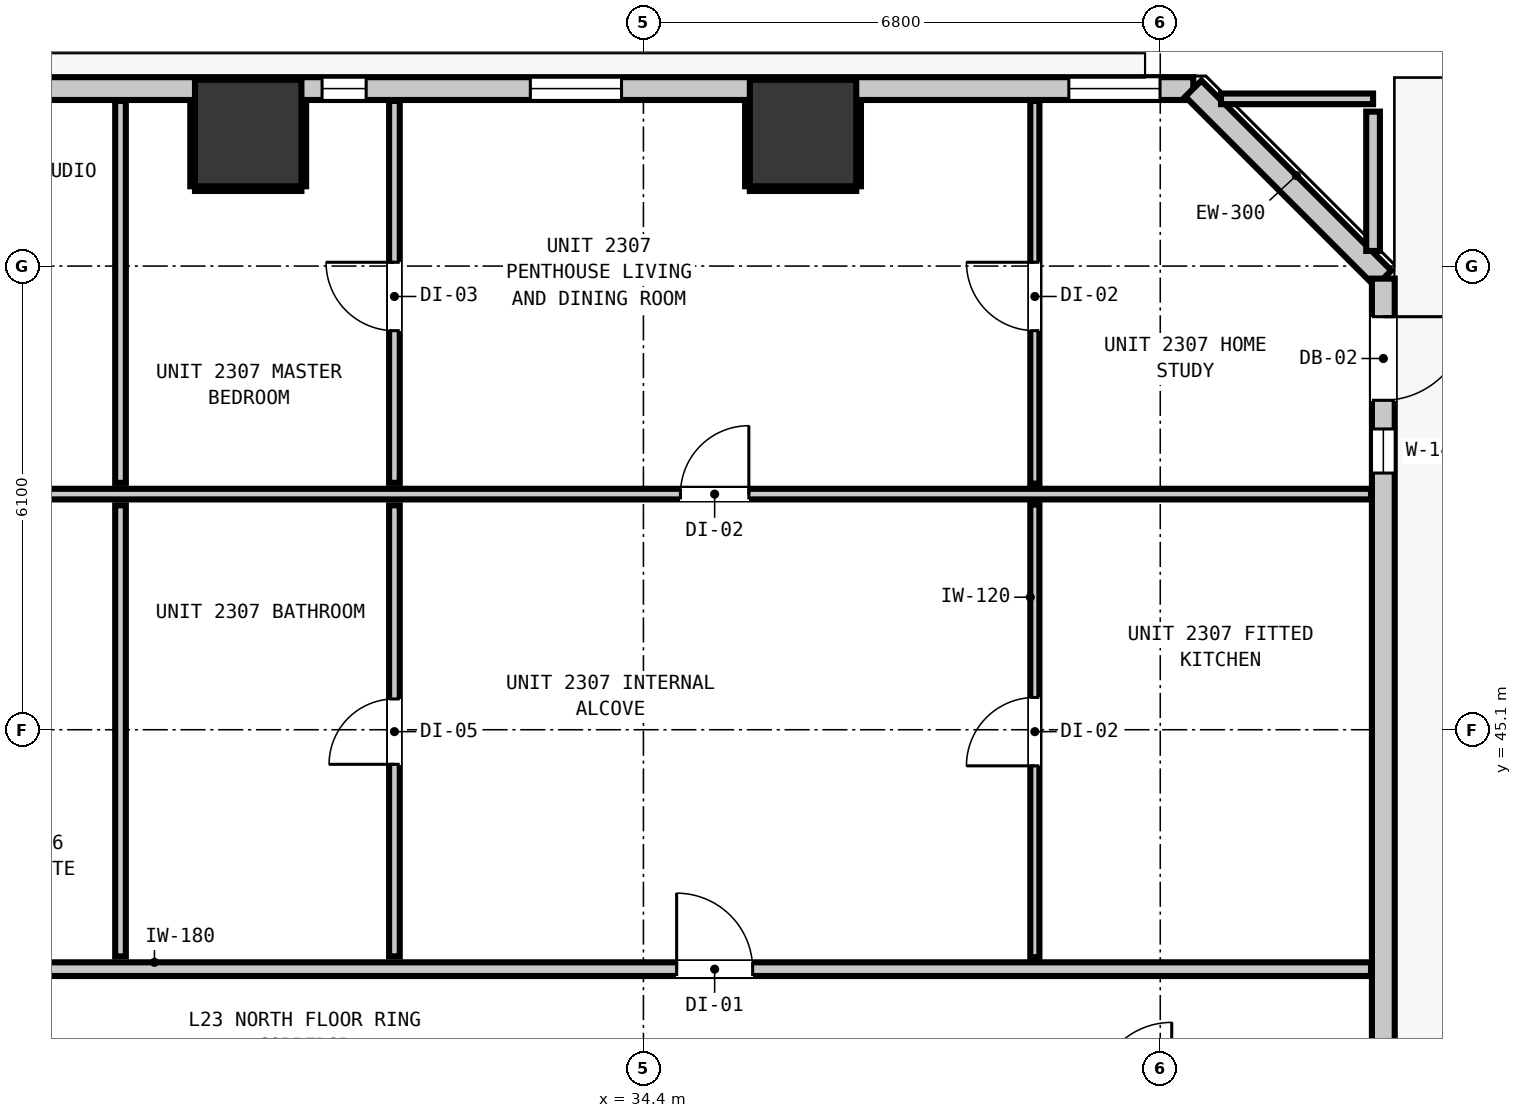
"""IFC4 building model, lengths in metres.
Left out: names, types, materials, properties, quantities, classifications, styles, units other than length and angle.
Written with IfcOpenShell. Run it as: python <this file> out.ifc"""

import sys

from ifc_helpers import new_model, si_unit, direction, frame, frame_2d, origin, origin_2d, place, context, subcontext, project, spatial, rectangle, extrude, element, fill, save


model = new_model("IFC4")
c1 = context("Model", 3, precision=1e-05, world=origin(), true_north=direction((0.0, 1.0)))
c2 = subcontext(c1, "Body", "Model", "MODEL_VIEW")
j1 = project(units=[si_unit("LENGTHUNIT", "METRE"), si_unit("PLANEANGLEUNIT", "RADIAN")], contexts=[c1])
p1 = place(None, origin())
s1 = spatial("IfcSite", under=j1, at=p1, CompositionType="ELEMENT")
p2 = place(p1, origin())
s2 = spatial("IfcBuilding", under=s1, at=p2, CompositionType="ELEMENT")
p3 = place(p2, frame((0.0, 0.0, 81.76)))
s3 = spatial("IfcBuildingStorey", under=s2, at=p3, CompositionType="ELEMENT", Elevation=81.76)
for number, where, z_axis, x_axis in (
    (1, (29.2, 52.95, -0.2), (0.0, 0.0, 1.0), (1.0, 0.0, 0.0)),
    (2, (36.5, 52.95, -0.2), (0.0, 0.0, 1.0), (1.0, 0.0, 0.0)),
):
    element("IfcColumn", number, at=place(p3, frame(where, z_axis=z_axis, x_axis=x_axis)), inside=s3, PredefinedType="COLUMN", context=c2, shape_type="SweptSolid", body=[
        extrude(rectangle(XDim=1.4, YDim=1.4, at=origin_2d()), origin(), (0.0, 0.0, 1.0), 3.52),
    ])
p4 = place(p3, frame((4.165, 53.535, 0.0), z_axis=(0.0, 0.0, 1.0), x_axis=(1.0, 0.0, 0.0)))
e3 = element("IfcWall", 3, at=p4, inside=s3, PredefinedType="STANDARD", context=c2, shape_type="SweptSolid", body=[
    extrude(rectangle(XDim=37.47, YDim=0.3, at=frame_2d((18.735, 0.0))), origin(), (0.0, 0.0, 1.0), 3.06),
])
p5 = place(p4, frame((1.951, 0.0, 0.0)))
e4 = element("IfcOpeningElement", 4, at=p5, cuts=e3, PredefinedType="OPENING", context=c2, shape_type="SweptSolid", body=[
    extrude(rectangle(XDim=1.0, YDim=2.15, at=frame_2d((0.5, 1.075))), frame((0.0, 0.16, 0.0), z_axis=(0.0, -1.0, 0.0), x_axis=(1.0, 0.0, 0.0)), (0.0, 0.0, 1.0), 0.32),
])
p6 = place(p4, frame((4.753, 0.0, 0.85)))
e5 = element("IfcOpeningElement", 5, at=p6, cuts=e3, PredefinedType="OPENING", context=c2, shape_type="SweptSolid", body=[
    extrude(rectangle(XDim=1.2, YDim=1.8, at=frame_2d((0.6, 0.9))), frame((0.0, 0.16, 0.0), z_axis=(0.0, -1.0, 0.0), x_axis=(1.0, 0.0, 0.0)), (0.0, 0.0, 1.0), 0.32),
])
p7 = place(p4, frame((0.324, 0.0, 0.85)))
e6 = element("IfcOpeningElement", 6, at=p7, cuts=e3, PredefinedType="OPENING", context=c2, shape_type="SweptSolid", body=[
    extrude(rectangle(XDim=0.58, YDim=1.5, at=frame_2d((0.29, 0.75))), frame((0.0, 0.16, 0.0), z_axis=(0.0, -1.0, 0.0), x_axis=(1.0, 0.0, 0.0)), (0.0, 0.0, 1.0), 0.32),
])
p8 = place(p4, frame((10.571, 0.0, 0.85)))
e7 = element("IfcOpeningElement", 7, at=p8, cuts=e3, PredefinedType="OPENING", context=c2, shape_type="SweptSolid", body=[
    extrude(rectangle(XDim=1.2, YDim=1.8, at=frame_2d((0.6, 0.9))), frame((0.0, 0.16, 0.0), z_axis=(0.0, -1.0, 0.0), x_axis=(1.0, 0.0, 0.0)), (0.0, 0.0, 1.0), 0.32),
])
p9 = place(p4, frame((13.671, 0.0, 0.85)))
e8 = element("IfcOpeningElement", 8, at=p9, cuts=e3, PredefinedType="OPENING", context=c2, shape_type="SweptSolid", body=[
    extrude(rectangle(XDim=1.2, YDim=1.8, at=frame_2d((0.6, 0.9))), frame((0.0, 0.16, 0.0), z_axis=(0.0, -1.0, 0.0), x_axis=(1.0, 0.0, 0.0)), (0.0, 0.0, 1.0), 0.32),
])
p10 = place(p4, frame((28.747, 0.0, 0.85)))
e9 = element("IfcOpeningElement", 9, at=p10, cuts=e3, PredefinedType="OPENING", context=c2, shape_type="SweptSolid", body=[
    extrude(rectangle(XDim=1.2, YDim=1.8, at=frame_2d((0.6, 0.9))), frame((0.0, 0.16, 0.0), z_axis=(0.0, -1.0, 0.0), x_axis=(1.0, 0.0, 0.0)), (0.0, 0.0, 1.0), 0.32),
])
p11 = place(p4, frame((26.007, 0.0, 0.85)))
e10 = element("IfcOpeningElement", 10, at=p11, cuts=e3, PredefinedType="OPENING", context=c2, shape_type="SweptSolid", body=[
    extrude(rectangle(XDim=0.58, YDim=1.5, at=frame_2d((0.29, 0.75))), frame((0.0, 0.16, 0.0), z_axis=(0.0, -1.0, 0.0), x_axis=(1.0, 0.0, 0.0)), (0.0, 0.0, 1.0), 0.32),
])
p12 = place(p4, frame((35.832, 0.0, 0.85)))
e11 = element("IfcOpeningElement", 11, at=p12, cuts=e3, PredefinedType="OPENING", context=c2, shape_type="SweptSolid", body=[
    extrude(rectangle(XDim=1.2, YDim=1.8, at=frame_2d((0.6, 0.9))), frame((0.0, 0.16, 0.0), z_axis=(0.0, -1.0, 0.0), x_axis=(1.0, 0.0, 0.0)), (0.0, 0.0, 1.0), 0.32),
])
p13 = place(p3, frame((41.635, 53.535, 0.0), z_axis=(0.0, 0.0, 1.0), x_axis=(0.707106781187, -0.707106781187, 0.0)))
e12 = element("IfcWall", 12, at=p13, inside=s3, PredefinedType="STANDARD", context=c2, shape_type="SweptSolid", body=[
    extrude(rectangle(XDim=3.536, YDim=0.3, at=frame_2d((1.768, 0.0))), origin(), (0.0, 0.0, 1.0), 3.06),
])
p14 = place(p3, frame((44.135, 51.035, 0.0), z_axis=(0.0, 0.0, 1.0), x_axis=(0.0, -1.0, 0.0)))
e13 = element("IfcWall", 13, at=p14, inside=s3, PredefinedType="STANDARD", context=c2, shape_type="SweptSolid", body=[
    extrude(rectangle(XDim=34.67, YDim=0.3, at=frame_2d((17.335, 0.0))), origin(), (0.0, 0.0, 1.0), 3.06),
])
p15 = place(p14, frame((0.501, 0.0, 0.0)))
e14 = element("IfcOpeningElement", 14, at=p15, cuts=e13, PredefinedType="OPENING", context=c2, shape_type="SweptSolid", body=[
    extrude(rectangle(XDim=1.1, YDim=2.15, at=frame_2d((0.55, 1.075))), frame((0.0, 0.16, 0.0), z_axis=(0.0, -1.0, 0.0), x_axis=(1.0, 0.0, 0.0)), (0.0, 0.0, 1.0), 0.32),
])
p16 = place(p14, frame((1.978, 0.0, 0.85)))
e15 = element("IfcOpeningElement", 15, at=p16, cuts=e13, PredefinedType="OPENING", context=c2, shape_type="SweptSolid", body=[
    extrude(rectangle(XDim=0.58, YDim=1.5, at=frame_2d((0.29, 0.75))), frame((0.0, 0.16, 0.0), z_axis=(0.0, -1.0, 0.0), x_axis=(1.0, 0.0, 0.0)), (0.0, 0.0, 1.0), 0.32),
])
p17 = place(p14, frame((26.335, 0.0, 0.85)))
e16 = element("IfcOpeningElement", 16, at=p17, cuts=e13, PredefinedType="OPENING", context=c2, shape_type="SweptSolid", body=[
    extrude(rectangle(XDim=1.2, YDim=1.8, at=frame_2d((0.6, 0.9))), frame((0.0, 0.16, 0.0), z_axis=(0.0, -1.0, 0.0), x_axis=(1.0, 0.0, 0.0)), (0.0, 0.0, 1.0), 0.32),
])
p18 = place(p14, frame((13.551, 0.0, 0.85)))
e17 = element("IfcOpeningElement", 17, at=p18, cuts=e13, PredefinedType="OPENING", context=c2, shape_type="SweptSolid", body=[
    extrude(rectangle(XDim=1.2, YDim=1.8, at=frame_2d((0.6, 0.9))), frame((0.0, 0.16, 0.0), z_axis=(0.0, -1.0, 0.0), x_axis=(1.0, 0.0, 0.0)), (0.0, 0.0, 1.0), 0.32),
])
p19 = place(p3, frame((1.827, 41.95, 0.0), z_axis=(0.0, 0.0, 1.0), x_axis=(1.0, 0.0, 0.0)))
e18 = element("IfcWall", 18, at=p19, inside=s3, PredefinedType="PARTITIONING", context=c2, shape_type="SweptSolid", body=[
    extrude(rectangle(XDim=42.146, YDim=0.18, at=frame_2d((21.073, 0.0))), origin(), (0.0, 0.0, 1.0), 3.06),
])
p20 = place(p19, frame((8.668, 0.0, 0.0)))
e19 = element("IfcOpeningElement", 19, at=p20, cuts=e18, PredefinedType="OPENING", context=c2, shape_type="SweptSolid", body=[
    extrude(rectangle(XDim=1.0, YDim=2.15, at=frame_2d((0.5, 1.075))), frame((0.0, 0.1, 0.0), z_axis=(0.0, -1.0, 0.0), x_axis=(1.0, 0.0, 0.0)), (0.0, 0.0, 1.0), 0.2),
])
p21 = place(p19, frame((18.269, 0.0, 0.0)))
e20 = element("IfcOpeningElement", 20, at=p21, cuts=e18, PredefinedType="OPENING", context=c2, shape_type="SweptSolid", body=[
    extrude(rectangle(XDim=1.0, YDim=2.15, at=frame_2d((0.5, 1.075))), frame((0.0, 0.1, 0.0), z_axis=(0.0, -1.0, 0.0), x_axis=(1.0, 0.0, 0.0)), (0.0, 0.0, 1.0), 0.2),
])
p22 = place(p19, frame((33.01, 0.0, 0.0)))
e21 = element("IfcOpeningElement", 21, at=p22, cuts=e18, PredefinedType="OPENING", context=c2, shape_type="SweptSolid", body=[
    extrude(rectangle(XDim=1.0, YDim=2.15, at=frame_2d((0.5, 1.075))), frame((0.0, 0.1, 0.0), z_axis=(0.0, -1.0, 0.0), x_axis=(1.0, 0.0, 0.0)), (0.0, 0.0, 1.0), 0.2),
])
p23 = place(p3, frame((11.82, 48.2, 0.0), z_axis=(0.0, 0.0, 1.0), x_axis=(1.0, 0.0, 0.0)))
e22 = element("IfcWall", 22, at=p23, inside=s3, PredefinedType="PARTITIONING", context=c2, shape_type="SweptSolid", body=[
    extrude(rectangle(XDim=32.153, YDim=0.14, at=frame_2d((16.076, 0.0))), origin(), (0.0, 0.0, 1.0), 3.06),
])
p24 = place(p23, frame((8.327, 0.0, 0.0)))
e23 = element("IfcOpeningElement", 23, at=p24, cuts=e22, PredefinedType="OPENING", context=c2, shape_type="SweptSolid", body=[
    extrude(rectangle(XDim=0.9, YDim=2.1, at=frame_2d((0.45, 1.05))), frame((0.0, 0.08, 0.0), z_axis=(0.0, -1.0, 0.0), x_axis=(1.0, 0.0, 0.0)), (0.0, 0.0, 1.0), 0.16),
])
p25 = place(p23, frame((23.067, 0.0, 0.0)))
e24 = element("IfcOpeningElement", 24, at=p25, cuts=e22, PredefinedType="OPENING", context=c2, shape_type="SweptSolid", body=[
    extrude(rectangle(XDim=0.9, YDim=2.1, at=frame_2d((0.45, 1.05))), frame((0.0, 0.08, 0.0), z_axis=(0.0, -1.0, 0.0), x_axis=(1.0, 0.0, 0.0)), (0.0, 0.0, 1.0), 0.16),
])
p26 = place(p3, frame((41.999, 53.4, 0.0), z_axis=(0.0, 0.0, 1.0), x_axis=(1.0, 0.0, 0.0)))
e25 = element("IfcWall", 25, at=p26, inside=s3, PredefinedType="PARTITIONING", context=c2, shape_type="SweptSolid", body=[
    extrude(rectangle(XDim=2.001, YDim=0.14, at=frame_2d((1.0, 0.0))), origin(), (0.0, 0.0, 1.0), 3.06),
])
p27 = place(p3, frame((44.0, 51.399, 0.0), z_axis=(0.0, 0.0, 1.0), x_axis=(0.0, 1.0, 0.0)))
e26 = element("IfcWall", 26, at=p27, inside=s3, PredefinedType="PARTITIONING", context=c2, shape_type="SweptSolid", body=[
    extrude(rectangle(XDim=1.833, YDim=0.18, at=frame_2d((0.917, 0.0))), origin(), (0.0, 0.0, 1.0), 3.06),
])
p28 = place(p3, frame((27.52, 42.118, 0.0), z_axis=(0.0, 0.0, 1.0), x_axis=(0.0, 1.0, 0.0)))
e27 = element("IfcWall", 27, at=p28, inside=s3, PredefinedType="PARTITIONING", context=c2, shape_type="SweptSolid", body=[
    extrude(rectangle(XDim=5.934, YDim=0.14, at=frame_2d((2.967, 0.0))), origin(), (0.0, 0.0, 1.0), 3.06),
])
p29 = place(p3, frame((27.52, 48.348, 0.0), z_axis=(0.0, 0.0, 1.0), x_axis=(0.0, 1.0, 0.0)))
e28 = element("IfcWall", 28, at=p29, inside=s3, PredefinedType="PARTITIONING", context=c2, shape_type="SweptSolid", body=[
    extrude(rectangle(XDim=5.025, YDim=0.14, at=frame_2d((2.513, 0.0))), origin(), (0.0, 0.0, 1.0), 3.06),
])
p30 = place(p3, frame((31.124, 42.118, 0.0), z_axis=(0.0, 0.0, 1.0), x_axis=(0.0, 1.0, 0.0)))
e29 = element("IfcWall", 29, at=p30, inside=s3, PredefinedType="PARTITIONING", context=c2, shape_type="SweptSolid", body=[
    extrude(rectangle(XDim=5.934, YDim=0.14, at=frame_2d((2.967, 0.0))), origin(), (0.0, 0.0, 1.0), 3.06),
])
p31 = place(p30, frame((2.527, 0.0, 0.0)))
e30 = element("IfcOpeningElement", 30, at=p31, cuts=e29, PredefinedType="OPENING", context=c2, shape_type="SweptSolid", body=[
    extrude(rectangle(XDim=0.86, YDim=2.02, at=frame_2d((0.43, 1.01))), frame((0.0, 0.08, 0.0), z_axis=(0.0, -1.0, 0.0), x_axis=(1.0, 0.0, 0.0)), (0.0, 0.0, 1.0), 0.16),
])
p32 = place(p3, frame((31.124, 48.348, 0.0), z_axis=(0.0, 0.0, 1.0), x_axis=(0.0, 1.0, 0.0)))
e31 = element("IfcWall", 31, at=p32, inside=s3, PredefinedType="PARTITIONING", context=c2, shape_type="SweptSolid", body=[
    extrude(rectangle(XDim=5.025, YDim=0.14, at=frame_2d((2.513, 0.0))), origin(), (0.0, 0.0, 1.0), 3.06),
])
p33 = place(p32, frame((2.002, 0.0, 0.0)))
e32 = element("IfcOpeningElement", 32, at=p33, cuts=e31, PredefinedType="OPENING", context=c2, shape_type="SweptSolid", body=[
    extrude(rectangle(XDim=0.9, YDim=2.1, at=frame_2d((0.45, 1.05))), frame((0.0, 0.08, 0.0), z_axis=(0.0, -1.0, 0.0), x_axis=(1.0, 0.0, 0.0)), (0.0, 0.0, 1.0), 0.16),
])
p34 = place(p3, frame((39.55, 42.108, 0.0), z_axis=(0.0, 0.0, 1.0), x_axis=(0.0, 1.0, 0.0)))
e33 = element("IfcWall", 33, at=p34, inside=s3, PredefinedType="PARTITIONING", context=c2, shape_type="SweptSolid", body=[
    extrude(rectangle(XDim=5.954, YDim=0.12, at=frame_2d((2.977, 0.0))), origin(), (0.0, 0.0, 1.0), 2.445),
])
p35 = place(p34, frame((2.517, 0.0, 0.0)))
e34 = element("IfcOpeningElement", 34, at=p35, cuts=e33, PredefinedType="OPENING", context=c2, shape_type="SweptSolid", body=[
    extrude(rectangle(XDim=0.9, YDim=2.1, at=frame_2d((0.45, 1.05))), frame((0.0, 0.07, 0.0), z_axis=(0.0, -1.0, 0.0), x_axis=(1.0, 0.0, 0.0)), (0.0, 0.0, 1.0), 0.14),
])
p36 = place(p3, frame((39.55, 48.338, 0.0), z_axis=(0.0, 0.0, 1.0), x_axis=(0.0, 1.0, 0.0)))
e35 = element("IfcWall", 35, at=p36, inside=s3, PredefinedType="PARTITIONING", context=c2, shape_type="SweptSolid", body=[
    extrude(rectangle(XDim=5.035, YDim=0.12, at=frame_2d((2.518, 0.0))), origin(), (0.0, 0.0, 1.0), 3.06),
])
p37 = place(p36, frame((2.012, 0.0, 0.0)))
e36 = element("IfcOpeningElement", 36, at=p37, cuts=e35, PredefinedType="OPENING", context=c2, shape_type="SweptSolid", body=[
    extrude(rectangle(XDim=0.9, YDim=2.1, at=frame_2d((0.45, 1.05))), frame((0.0, 0.07, 0.0), z_axis=(0.0, -1.0, 0.0), x_axis=(1.0, 0.0, 0.0)), (0.0, 0.0, 1.0), 0.14),
])
p38 = place(p3, frame((28.5, 52.218, 0.0), z_axis=(0.0, 0.0, 1.0), x_axis=(1.0, 0.0, 0.0)))
e37 = element("IfcWall", 37, at=p38, inside=s3, PredefinedType="PARTITIONING", context=c2, shape_type="SweptSolid", body=[
    extrude(rectangle(XDim=1.4, YDim=0.06, at=frame_2d((0.7, 0.0))), origin(), (0.0, 0.0, 1.0), 1.45),
])
for number, where, z_axis, x_axis in (
    (38, (28.468, 52.25, 0.0), (0.0, 0.0, 1.0), (0.0, 1.0, 0.0)),
    (39, (29.932, 52.25, 0.0), (0.0, 0.0, 1.0), (0.0, 1.0, 0.0)),
):
    element("IfcWall", number, at=place(p3, frame(where, z_axis=z_axis, x_axis=x_axis)), inside=s3, PredefinedType="PARTITIONING", context=c2, shape_type="SweptSolid", body=[
        extrude(rectangle(XDim=1.12, YDim=0.06, at=frame_2d((0.56, 0.0))), origin(), (0.0, 0.0, 1.0), 1.45),
    ])
p39 = place(p3, frame((35.8, 52.218, 0.0), z_axis=(0.0, 0.0, 1.0), x_axis=(1.0, 0.0, 0.0)))
e40 = element("IfcWall", 40, at=p39, inside=s3, PredefinedType="PARTITIONING", context=c2, shape_type="SweptSolid", body=[
    extrude(rectangle(XDim=1.4, YDim=0.06, at=frame_2d((0.7, 0.0))), origin(), (0.0, 0.0, 1.0), 1.45),
])
for number, where, z_axis, x_axis in (
    (41, (35.768, 52.25, 0.0), (0.0, 0.0, 1.0), (0.0, 1.0, 0.0)),
    (42, (37.232, 52.25, 0.0), (0.0, 0.0, 1.0), (0.0, 1.0, 0.0)),
):
    element("IfcWall", number, at=place(p3, frame(where, z_axis=z_axis, x_axis=x_axis)), inside=s3, PredefinedType="PARTITIONING", context=c2, shape_type="SweptSolid", body=[
        extrude(rectangle(XDim=1.12, YDim=0.06, at=frame_2d((0.56, 0.0))), origin(), (0.0, 0.0, 1.0), 1.45),
    ])
p40 = place(p15, origin())
e43 = element("IfcDoor", 43, at=p40, inside=s3, OperationType="SINGLE_SWING_LEFT", PredefinedType="DOOR", context=c2, shape_type="SweptSolid", body=[
    extrude(rectangle(XDim=1.1, YDim=2.15, at=frame_2d((0.55, 1.075))), frame((0.0, 0.025, 0.0), z_axis=(0.0, -1.0, 0.0), x_axis=(1.0, 0.0, 0.0)), (0.0, 0.0, 1.0), 0.05),
])
fill(e14, e43)
p41 = place(p10, origin())
e44 = element("IfcWindow", 44, at=p41, inside=s3, PartitioningType="SINGLE_PANEL", PredefinedType="WINDOW", context=c2, shape_type="SweptSolid", body=[
    extrude(rectangle(XDim=1.2, YDim=1.8, at=frame_2d((0.6, 0.9))), frame((0.0, 0.03, 0.0), z_axis=(0.0, -1.0, 0.0), x_axis=(1.0, 0.0, 0.0)), (0.0, 0.0, 1.0), 0.06),
])
fill(e9, e44)
p42 = place(p11, origin())
e45 = element("IfcWindow", 45, at=p42, inside=s3, PartitioningType="SINGLE_PANEL", PredefinedType="WINDOW", context=c2, shape_type="SweptSolid", body=[
    extrude(rectangle(XDim=0.58, YDim=1.5, at=frame_2d((0.29, 0.75))), frame((0.0, 0.03, 0.0), z_axis=(0.0, -1.0, 0.0), x_axis=(1.0, 0.0, 0.0)), (0.0, 0.0, 1.0), 0.06),
])
fill(e10, e45)
p43 = place(p12, origin())
e46 = element("IfcWindow", 46, at=p43, inside=s3, PartitioningType="SINGLE_PANEL", PredefinedType="WINDOW", context=c2, shape_type="SweptSolid", body=[
    extrude(rectangle(XDim=1.2, YDim=1.8, at=frame_2d((0.6, 0.9))), frame((0.0, 0.03, 0.0), z_axis=(0.0, -1.0, 0.0), x_axis=(1.0, 0.0, 0.0)), (0.0, 0.0, 1.0), 0.06),
])
fill(e11, e46)
p44 = place(p16, origin())
e47 = element("IfcWindow", 47, at=p44, inside=s3, PartitioningType="SINGLE_PANEL", PredefinedType="WINDOW", context=c2, shape_type="SweptSolid", body=[
    extrude(rectangle(XDim=0.58, YDim=1.5, at=frame_2d((0.29, 0.75))), frame((0.0, 0.03, 0.0), z_axis=(0.0, -1.0, 0.0), x_axis=(1.0, 0.0, 0.0)), (0.0, 0.0, 1.0), 0.06),
])
fill(e15, e47)
p45 = place(p22, origin())
e48 = element("IfcDoor", 48, at=p45, inside=s3, OperationType="SINGLE_SWING_LEFT", PredefinedType="DOOR", context=c2, shape_type="SweptSolid", body=[
    extrude(rectangle(XDim=1.0, YDim=2.15, at=frame_2d((0.5, 1.075))), frame((0.0, 0.025, 0.0), z_axis=(0.0, -1.0, 0.0), x_axis=(1.0, 0.0, 0.0)), (0.0, 0.0, 1.0), 0.05),
])
fill(e21, e48)
p46 = place(p25, origin())
e49 = element("IfcDoor", 49, at=p46, inside=s3, OperationType="SINGLE_SWING_RIGHT", PredefinedType="DOOR", context=c2, shape_type="SweptSolid", body=[
    extrude(rectangle(XDim=0.9, YDim=2.1, at=frame_2d((0.45, 1.05))), frame((0.0, 0.025, 0.0), z_axis=(0.0, -1.0, 0.0), x_axis=(1.0, 0.0, 0.0)), (0.0, 0.0, 1.0), 0.05),
])
fill(e24, e49)
p47 = place(p31, origin())
e50 = element("IfcDoor", 50, at=p47, inside=s3, OperationType="SINGLE_SWING_LEFT", PredefinedType="DOOR", context=c2, shape_type="SweptSolid", body=[
    extrude(rectangle(XDim=0.86, YDim=2.02, at=frame_2d((0.43, 1.01))), frame((0.0, 0.025, 0.0), z_axis=(0.0, -1.0, 0.0), x_axis=(1.0, 0.0, 0.0)), (0.0, 0.0, 1.0), 0.05),
])
fill(e30, e50)
p48 = place(p33, origin())
e51 = element("IfcDoor", 51, at=p48, inside=s3, OperationType="SINGLE_SWING_RIGHT", PredefinedType="DOOR", context=c2, shape_type="SweptSolid", body=[
    extrude(rectangle(XDim=0.9, YDim=2.1, at=frame_2d((0.45, 1.05))), frame((0.0, 0.025, 0.0), z_axis=(0.0, -1.0, 0.0), x_axis=(1.0, 0.0, 0.0)), (0.0, 0.0, 1.0), 0.05),
])
fill(e32, e51)
p49 = place(p35, origin())
e52 = element("IfcDoor", 52, at=p49, inside=s3, OperationType="SINGLE_SWING_LEFT", PredefinedType="DOOR", context=c2, shape_type="SweptSolid", body=[
    extrude(rectangle(XDim=0.9, YDim=2.1, at=frame_2d((0.45, 1.05))), frame((0.0, 0.025, 0.0), z_axis=(0.0, -1.0, 0.0), x_axis=(1.0, 0.0, 0.0)), (0.0, 0.0, 1.0), 0.05),
])
fill(e34, e52)
p50 = place(p37, origin())
e53 = element("IfcDoor", 53, at=p50, inside=s3, OperationType="SINGLE_SWING_RIGHT", PredefinedType="DOOR", context=c2, shape_type="SweptSolid", body=[
    extrude(rectangle(XDim=0.9, YDim=2.1, at=frame_2d((0.45, 1.05))), frame((0.0, 0.025, 0.0), z_axis=(0.0, -1.0, 0.0), x_axis=(1.0, 0.0, 0.0)), (0.0, 0.0, 1.0), 0.05),
])
fill(e36, e53)
save(model, sys.argv[1])
